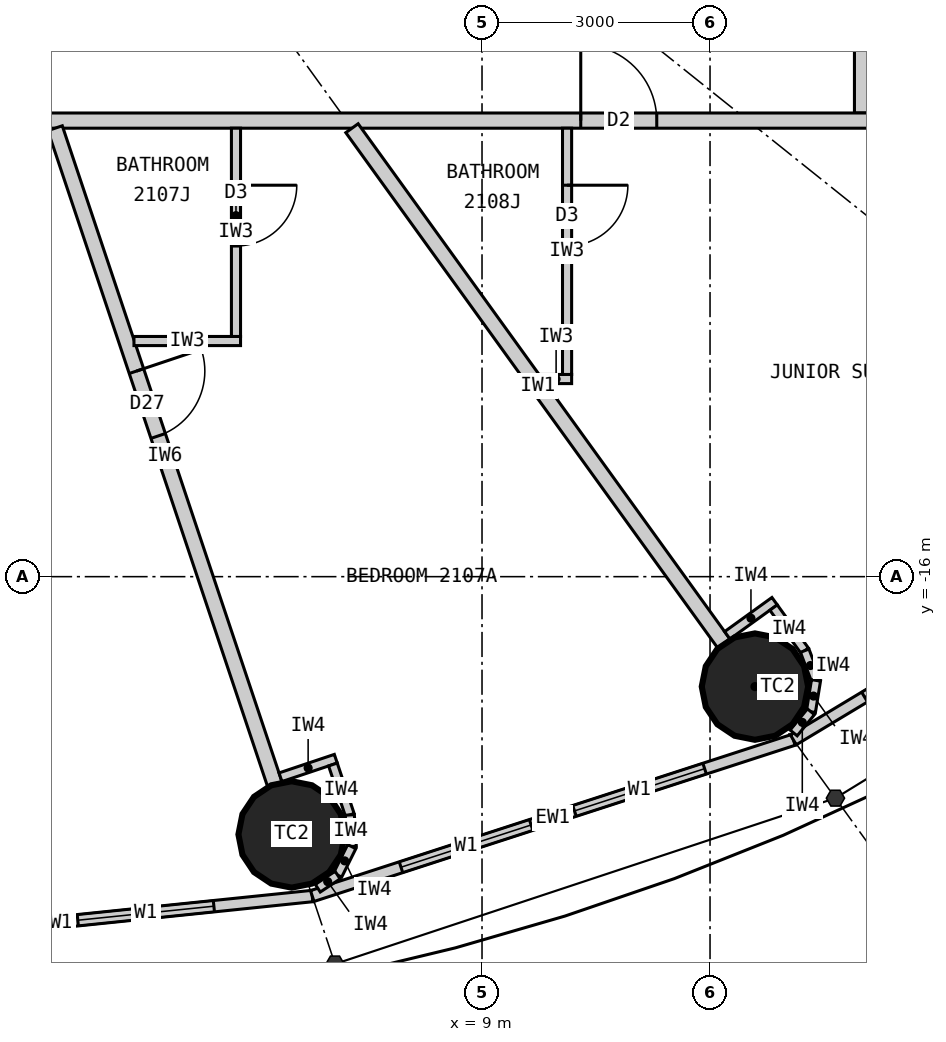
"""IFC4 building model, lengths in metres.
Left out: names, types, materials, properties, quantities, classifications, styles, units other than length and angle.
Written with IfcOpenShell. Run it as: python <this file> out.ifc"""

import sys

from ifc_helpers import new_model, si_unit, direction, frame, frame_2d, origin, origin_2d, place, context, subcontext, project, spatial, rectangle, circle, extrude, element, fill, save


model = new_model("IFC4")
c1 = context("Model", 3, precision=1e-05, world=origin(), true_north=direction((0.0, 1.0)))
c2 = subcontext(c1, "Body", "Model", "MODEL_VIEW")
j1 = project(units=[si_unit("LENGTHUNIT", "METRE"), si_unit("PLANEANGLEUNIT", "RADIAN")], contexts=[c1])
p1 = place(None, origin())
s1 = spatial("IfcSite", under=j1, at=p1, CompositionType="ELEMENT")
p2 = place(p1, origin())
s2 = spatial("IfcBuilding", under=s1, at=p2, CompositionType="ELEMENT")
p3 = place(p2, frame((0.0, 0.0, 83.7)))
s3 = spatial("IfcBuildingStorey", under=s2, at=p3, CompositionType="ELEMENT", Elevation=83.7)
for number, where, z_axis, x_axis in (
    (1, (6.495, -19.391, 0.0), (0.0, 0.0, 1.0), (1.0, 0.0, 0.0)),
    (2, (12.591, -17.447, 0.0), (0.0, 0.0, 1.0), (1.0, 0.0, 0.0)),
):
    element("IfcColumn", number, at=place(p3, frame(where, z_axis=z_axis, x_axis=x_axis)), inside=s3, PredefinedType="COLUMN", context=c2, shape_type="SweptSolid", body=[
        extrude(circle(Radius=0.7, at=origin_2d()), origin(), (0.0, 0.0, 1.0), 3.3),
    ])
p4 = place(p3, frame((0.0, -20.9, 0.0), z_axis=(0.0, 0.0, 1.0), x_axis=(0.994721394369, 0.102612609291, 0.0)))
e3 = element("IfcWall", 3, at=p4, inside=s3, PredefinedType="ELEMENTEDWALL", context=c2, shape_type="SweptSolid", body=[
    extrude(rectangle(XDim=6.802, YDim=0.15, at=frame_2d((3.401, 0.0))), origin(), (0.0, 0.0, 1.0), 3.12),
])
p5 = place(p4, frame((1.301, 0.0, 0.9)))
e4 = element("IfcOpeningElement", 4, at=p5, cuts=e3, PredefinedType="OPENING", context=c2, shape_type="SweptSolid", body=[
    extrude(rectangle(XDim=1.8, YDim=1.9, at=frame_2d((0.9, 0.95))), frame((0.0, 0.085, 0.0), z_axis=(0.0, -1.0, 0.0), x_axis=(1.0, 0.0, 0.0)), (0.0, 0.0, 1.0), 0.17),
])
p6 = place(p4, frame((3.701, 0.0, 0.9)))
e5 = element("IfcOpeningElement", 5, at=p6, cuts=e3, PredefinedType="OPENING", context=c2, shape_type="SweptSolid", body=[
    extrude(rectangle(XDim=1.8, YDim=1.9, at=frame_2d((0.9, 0.95))), frame((0.0, 0.085, 0.0), z_axis=(0.0, -1.0, 0.0), x_axis=(1.0, 0.0, 0.0)), (0.0, 0.0, 1.0), 0.17),
])
p7 = place(p3, frame((6.766, -20.202, 0.0), z_axis=(0.0, 0.0, 1.0), x_axis=(0.951137534625, 0.308767534285, 0.0)))
e6 = element("IfcWall", 6, at=p7, inside=s3, PredefinedType="ELEMENTEDWALL", context=c2, shape_type="SweptSolid", body=[
    extrude(rectangle(XDim=6.655, YDim=0.15, at=frame_2d((3.328, 0.0))), origin(), (0.0, 0.0, 1.0), 3.12),
])
p8 = place(p7, frame((1.228, 0.0, 0.9)))
e7 = element("IfcOpeningElement", 7, at=p8, cuts=e6, PredefinedType="OPENING", context=c2, shape_type="SweptSolid", body=[
    extrude(rectangle(XDim=1.8, YDim=1.9, at=frame_2d((0.9, 0.95))), frame((0.0, 0.085, 0.0), z_axis=(0.0, -1.0, 0.0), x_axis=(1.0, 0.0, 0.0)), (0.0, 0.0, 1.0), 0.17),
])
p9 = place(p7, frame((3.628, 0.0, 0.9)))
e8 = element("IfcOpeningElement", 8, at=p9, cuts=e6, PredefinedType="OPENING", context=c2, shape_type="SweptSolid", body=[
    extrude(rectangle(XDim=1.8, YDim=1.9, at=frame_2d((0.9, 0.95))), frame((0.0, 0.085, 0.0), z_axis=(0.0, -1.0, 0.0), x_axis=(1.0, 0.0, 0.0)), (0.0, 0.0, 1.0), 0.17),
])
p10 = place(p3, frame((13.096, -18.147, 0.0), z_axis=(0.0, 0.0, 1.0), x_axis=(0.856983180864, 0.515344377787, 0.0)))
e9 = element("IfcWall", 9, at=p10, inside=s3, PredefinedType="ELEMENTEDWALL", context=c2, shape_type="SweptSolid", body=[
    extrude(rectangle(XDim=6.386, YDim=0.15, at=frame_2d((3.193, 0.0))), origin(), (0.0, 0.0, 1.0), 3.12),
])
p11 = place(p10, frame((1.093, 0.0, 0.9)))
e10 = element("IfcOpeningElement", 10, at=p11, cuts=e9, PredefinedType="OPENING", context=c2, shape_type="SweptSolid", body=[
    extrude(rectangle(XDim=1.8, YDim=1.9, at=frame_2d((0.9, 0.95))), frame((0.0, 0.085, 0.0), z_axis=(0.0, -1.0, 0.0), x_axis=(1.0, 0.0, 0.0)), (0.0, 0.0, 1.0), 0.17),
])
p12 = place(p10, frame((3.493, 0.0, 0.9)))
e11 = element("IfcOpeningElement", 11, at=p12, cuts=e9, PredefinedType="OPENING", context=c2, shape_type="SweptSolid", body=[
    extrude(rectangle(XDim=1.8, YDim=1.9, at=frame_2d((0.9, 0.95))), frame((0.0, 0.085, 0.0), z_axis=(0.0, -1.0, 0.0), x_axis=(1.0, 0.0, 0.0)), (0.0, 0.0, 1.0), 0.17),
])
p13 = place(p3, frame((14.0, -9.9, 0.0), z_axis=(0.0, 0.0, 1.0), x_axis=(0.0, 1.0, 0.0)))
e12 = element("IfcWall", 12, at=p13, inside=s3, PredefinedType="PARTITIONING", context=c2, shape_type="SweptSolid", body=[
    extrude(rectangle(XDim=19.8, YDim=0.2, at=frame_2d((9.9, 0.0))), origin(), (0.0, 0.0, 1.0), 3.12),
])
p14 = place(p13, frame((5.948, 0.0, 0.0)))
e13 = element("IfcOpeningElement", 13, at=p14, cuts=e12, PredefinedType="OPENING", context=c2, shape_type="SweptSolid", body=[
    extrude(rectangle(XDim=1.0, YDim=2.2, at=frame_2d((0.5, 1.1))), frame((0.0, 0.11, 0.0), z_axis=(0.0, -1.0, 0.0), x_axis=(1.0, 0.0, 0.0)), (0.0, 0.0, 1.0), 0.22),
])
p15 = place(p13, frame((11.46, 0.0, 0.0)))
e14 = element("IfcOpeningElement", 14, at=p15, cuts=e12, PredefinedType="OPENING", context=c2, shape_type="SweptSolid", body=[
    extrude(rectangle(XDim=1.0, YDim=2.2, at=frame_2d((0.5, 1.1))), frame((0.0, 0.11, 0.0), z_axis=(0.0, -1.0, 0.0), x_axis=(1.0, 0.0, 0.0)), (0.0, 0.0, 1.0), 0.22),
])
p16 = place(p3, frame((14.1, -10.0, 0.0), z_axis=(0.0, 0.0, 1.0), x_axis=(-1.0, 0.0, 0.0)))
e15 = element("IfcWall", 15, at=p16, inside=s3, PredefinedType="PARTITIONING", context=c2, shape_type="SweptSolid", body=[
    extrude(rectangle(XDim=28.2, YDim=0.2, at=frame_2d((14.1, 0.0))), origin(), (0.0, 0.0, 1.0), 3.12),
])
p17 = place(p16, frame((23.865, 0.0, 0.0)))
e16 = element("IfcOpeningElement", 16, at=p17, cuts=e15, PredefinedType="OPENING", context=c2, shape_type="SweptSolid", body=[
    extrude(rectangle(XDim=1.0, YDim=2.2, at=frame_2d((0.5, 1.1))), frame((0.0, 0.11, 0.0), z_axis=(0.0, -1.0, 0.0), x_axis=(1.0, 0.0, 0.0)), (0.0, 0.0, 1.0), 0.22),
])
p18 = place(p16, frame((18.529, 0.0, 0.0)))
e17 = element("IfcOpeningElement", 17, at=p18, cuts=e15, PredefinedType="OPENING", context=c2, shape_type="SweptSolid", body=[
    extrude(rectangle(XDim=1.0, YDim=2.2, at=frame_2d((0.5, 1.1))), frame((0.0, 0.11, 0.0), z_axis=(0.0, -1.0, 0.0), x_axis=(1.0, 0.0, 0.0)), (0.0, 0.0, 1.0), 0.22),
])
p19 = place(p16, frame((14.923, 0.0, 0.0)))
e18 = element("IfcOpeningElement", 18, at=p19, cuts=e15, PredefinedType="OPENING", context=c2, shape_type="SweptSolid", body=[
    extrude(rectangle(XDim=1.0, YDim=2.2, at=frame_2d((0.5, 1.1))), frame((0.0, 0.11, 0.0), z_axis=(0.0, -1.0, 0.0), x_axis=(1.0, 0.0, 0.0)), (0.0, 0.0, 1.0), 0.22),
])
p20 = place(p16, frame((2.801, 0.0, 0.0)))
e19 = element("IfcOpeningElement", 19, at=p20, cuts=e15, PredefinedType="OPENING", context=c2, shape_type="SweptSolid", body=[
    extrude(rectangle(XDim=1.0, YDim=2.2, at=frame_2d((0.5, 1.1))), frame((0.0, 0.11, 0.0), z_axis=(0.0, -1.0, 0.0), x_axis=(1.0, 0.0, 0.0)), (0.0, 0.0, 1.0), 0.22),
])
p21 = place(p3, frame((3.383, -10.1, 0.0), z_axis=(0.0, 0.0, 1.0), x_axis=(0.31759592231, -0.948226149256, 0.0)))
e20 = element("IfcWall", 20, at=p21, inside=s3, PredefinedType="PARTITIONING", context=c2, shape_type="SweptSolid", body=[
    extrude(rectangle(XDim=9.098, YDim=0.2, at=frame_2d((4.549, 0.0))), origin(), (0.0, 0.0, 1.0), 2.32),
])
p22 = place(p21, frame((3.37, 0.0, 0.0)))
e21 = element("IfcOpeningElement", 21, at=p22, cuts=e20, PredefinedType="OPENING", context=c2, shape_type="SweptSolid", body=[
    extrude(rectangle(XDim=0.9, YDim=2.1, at=frame_2d((0.45, 1.05))), frame((0.0, 0.11, 0.0), z_axis=(0.0, -1.0, 0.0), x_axis=(1.0, 0.0, 0.0)), (0.0, 0.0, 1.0), 0.22),
])
p23 = place(p3, frame((7.289, -10.1, 0.0), z_axis=(0.0, 0.0, 1.0), x_axis=(0.585198353053, -0.810890182197, 0.0)))
e22 = element("IfcWall", 22, at=p23, inside=s3, PredefinedType="PARTITIONING", context=c2, shape_type="SweptSolid", body=[
    extrude(rectangle(XDim=8.36, YDim=0.2, at=frame_2d((4.18, 0.0))), origin(), (0.0, 0.0, 1.0), 2.32),
])
p24 = place(p3, frame((4.421, -12.9, 0.0), z_axis=(0.0, 0.0, 1.0), x_axis=(1.0, 0.0, 0.0)))
e23 = element("IfcWall", 23, at=p24, inside=s3, PredefinedType="PARTITIONING", context=c2, shape_type="SweptSolid", body=[
    extrude(rectangle(XDim=1.402, YDim=0.12, at=frame_2d((0.701, 0.0))), origin(), (0.0, 0.0, 1.0), 3.12),
])
p25 = place(p3, frame((5.763, -10.1, 0.0), z_axis=(0.0, 0.0, 1.0), x_axis=(0.0, -1.0, 0.0)))
e24 = element("IfcWall", 24, at=p25, inside=s3, PredefinedType="PARTITIONING", context=c2, shape_type="SweptSolid", body=[
    extrude(rectangle(XDim=2.74, YDim=0.12, at=frame_2d((1.37, 0.0))), origin(), (0.0, 0.0, 1.0), 3.12),
])
p26 = place(p25, frame((0.75, 0.0, 0.0)))
e25 = element("IfcOpeningElement", 25, at=p26, cuts=e24, PredefinedType="OPENING", context=c2, shape_type="SweptSolid", body=[
    extrude(rectangle(XDim=0.8, YDim=2.1, at=frame_2d((0.4, 1.05))), frame((0.0, 0.07, 0.0), z_axis=(0.0, -1.0, 0.0), x_axis=(1.0, 0.0, 0.0)), (0.0, 0.0, 1.0), 0.14),
])
p27 = place(p3, frame((9.771, -13.4, 0.0), z_axis=(0.0, 0.0, 1.0), x_axis=(1.0, 0.0, 0.0)))
e26 = element("IfcWall", 26, at=p27, inside=s3, PredefinedType="PARTITIONING", context=c2, shape_type="SweptSolid", body=[
    extrude(rectangle(XDim=0.408, YDim=0.12, at=frame_2d((0.204, 0.0))), origin(), (0.0, 0.0, 1.0), 3.12),
])
p28 = place(p3, frame((10.119, -10.1, 0.0), z_axis=(0.0, 0.0, 1.0), x_axis=(0.0, -1.0, 0.0)))
e27 = element("IfcWall", 27, at=p28, inside=s3, PredefinedType="PARTITIONING", context=c2, shape_type="SweptSolid", body=[
    extrude(rectangle(XDim=3.24, YDim=0.12, at=frame_2d((1.62, 0.0))), origin(), (0.0, 0.0, 1.0), 3.12),
])
p29 = place(p28, frame((0.75, 0.0, 0.0)))
e28 = element("IfcOpeningElement", 28, at=p29, cuts=e27, PredefinedType="OPENING", context=c2, shape_type="SweptSolid", body=[
    extrude(rectangle(XDim=0.8, YDim=2.1, at=frame_2d((0.4, 1.05))), frame((0.0, 0.07, 0.0), z_axis=(0.0, -1.0, 0.0), x_axis=(1.0, 0.0, 0.0)), (0.0, 0.0, 1.0), 0.14),
])
p30 = place(p3, frame((6.348, -18.639, 0.0), z_axis=(0.0, 0.0, 1.0), x_axis=(0.948268951266, 0.317468102437, 0.0)))
e29 = element("IfcWall", 29, at=p30, inside=s3, PredefinedType="PARTITIONING", context=c2, shape_type="SweptSolid", body=[
    extrude(rectangle(XDim=0.768, YDim=0.12, at=frame_2d((0.384, 0.0))), origin(), (0.0, 0.0, 1.0), 3.12),
])
p31 = place(p3, frame((7.038, -18.471, 0.0), z_axis=(0.0, 0.0, 1.0), x_axis=(0.317378466199, -0.9482989556, 0.0)))
e30 = element("IfcWall", 30, at=p31, inside=s3, PredefinedType="PARTITIONING", context=c2, shape_type="SweptSolid", body=[
    extrude(rectangle(XDim=0.7, YDim=0.12, at=frame_2d((0.35, 0.0))), origin(), (0.0, 0.0, 1.0), 3.12),
])
p32 = place(p3, frame((7.26, -19.135, 0.0), z_axis=(0.0, 0.0, 1.0), x_axis=(0.0613238046, -0.99811792439, 0.0)))
e31 = element("IfcWall", 31, at=p32, inside=s3, PredefinedType="PARTITIONING", context=c2, shape_type="SweptSolid", body=[
    extrude(rectangle(XDim=0.418, YDim=0.12, at=frame_2d((0.209, 0.0))), origin(), (0.0, 0.0, 1.0), 3.12),
])
p33 = place(p3, frame((7.286, -19.552, 0.0), z_axis=(0.0, 0.0, 1.0), x_axis=(-0.445810757773, -0.89512723579, 0.0)))
e32 = element("IfcWall", 32, at=p33, inside=s3, PredefinedType="PARTITIONING", context=c2, shape_type="SweptSolid", body=[
    extrude(rectangle(XDim=0.418, YDim=0.12, at=frame_2d((0.209, 0.0))), origin(), (0.0, 0.0, 1.0), 3.12),
])
p34 = place(p3, frame((7.1, -19.926, 0.0), z_axis=(0.0, 0.0, 1.0), x_axis=(-0.833488262509, -0.552537162787, 0.0)))
e33 = element("IfcWall", 33, at=p34, inside=s3, PredefinedType="PARTITIONING", context=c2, shape_type="SweptSolid", body=[
    extrude(rectangle(XDim=0.313, YDim=0.12, at=frame_2d((0.156, 0.0))), origin(), (0.0, 0.0, 1.0), 3.12),
])
p35 = place(p3, frame((12.227, -16.772, 0.0), z_axis=(0.0, 0.0, 1.0), x_axis=(0.810821798253, 0.585293098778, 0.0)))
e34 = element("IfcWall", 34, at=p35, inside=s3, PredefinedType="PARTITIONING", context=c2, shape_type="SweptSolid", body=[
    extrude(rectangle(XDim=0.768, YDim=0.12, at=frame_2d((0.384, 0.0))), origin(), (0.0, 0.0, 1.0), 3.12),
])
p36 = place(p3, frame((12.836, -16.406, 0.0), z_axis=(0.0, 0.0, 1.0), x_axis=(0.585223113993, -0.810872312296, 0.0)))
e35 = element("IfcWall", 35, at=p36, inside=s3, PredefinedType="PARTITIONING", context=c2, shape_type="SweptSolid", body=[
    extrude(rectangle(XDim=0.7, YDim=0.12, at=frame_2d((0.35, 0.0))), origin(), (0.0, 0.0, 1.0), 3.12),
])
p37 = place(p3, frame((13.246, -16.974, 0.0), z_axis=(0.0, 0.0, 1.0), x_axis=(0.355728122235, -0.934589483705, 0.0)))
e36 = element("IfcWall", 36, at=p37, inside=s3, PredefinedType="PARTITIONING", context=c2, shape_type="SweptSolid", body=[
    extrude(rectangle(XDim=0.418, YDim=0.12, at=frame_2d((0.209, 0.0))), origin(), (0.0, 0.0, 1.0), 3.12),
])
p38 = place(p3, frame((13.394, -17.365, 0.0), z_axis=(0.0, 0.0, 1.0), x_axis=(-0.159379276926, -0.987217425943, 0.0)))
e37 = element("IfcWall", 37, at=p38, inside=s3, PredefinedType="PARTITIONING", context=c2, shape_type="SweptSolid", body=[
    extrude(rectangle(XDim=0.418, YDim=0.12, at=frame_2d((0.209, 0.0))), origin(), (0.0, 0.0, 1.0), 3.12),
])
p39 = place(p3, frame((13.328, -17.777, 0.0), z_axis=(0.0, 0.0, 1.0), x_axis=(-0.632276783541, -0.774742582407, 0.0)))
e38 = element("IfcWall", 38, at=p39, inside=s3, PredefinedType="PARTITIONING", context=c2, shape_type="SweptSolid", body=[
    extrude(rectangle(XDim=0.36, YDim=0.12, at=frame_2d((0.18, 0.0))), origin(), (0.0, 0.0, 1.0), 3.12),
])
p40 = place(p6, origin())
e39 = element("IfcWindow", 39, at=p40, inside=s3, PartitioningType="SINGLE_PANEL", PredefinedType="WINDOW", context=c2, shape_type="SweptSolid", body=[
    extrude(rectangle(XDim=1.8, YDim=1.9, at=frame_2d((0.9, 0.95))), frame((0.0, 0.03, 0.0), z_axis=(0.0, -1.0, 0.0), x_axis=(1.0, 0.0, 0.0)), (0.0, 0.0, 1.0), 0.06),
])
fill(e5, e39)
p41 = place(p8, origin())
e40 = element("IfcWindow", 40, at=p41, inside=s3, PartitioningType="SINGLE_PANEL", PredefinedType="WINDOW", context=c2, shape_type="SweptSolid", body=[
    extrude(rectangle(XDim=1.8, YDim=1.9, at=frame_2d((0.9, 0.95))), frame((0.0, 0.03, 0.0), z_axis=(0.0, -1.0, 0.0), x_axis=(1.0, 0.0, 0.0)), (0.0, 0.0, 1.0), 0.06),
])
fill(e7, e40)
p42 = place(p9, origin())
e41 = element("IfcWindow", 41, at=p42, inside=s3, PartitioningType="SINGLE_PANEL", PredefinedType="WINDOW", context=c2, shape_type="SweptSolid", body=[
    extrude(rectangle(XDim=1.8, YDim=1.9, at=frame_2d((0.9, 0.95))), frame((0.0, 0.03, 0.0), z_axis=(0.0, -1.0, 0.0), x_axis=(1.0, 0.0, 0.0)), (0.0, 0.0, 1.0), 0.06),
])
fill(e8, e41)
p43 = place(p11, origin())
e42 = element("IfcWindow", 42, at=p43, inside=s3, PartitioningType="SINGLE_PANEL", PredefinedType="WINDOW", context=c2, shape_type="SweptSolid", body=[
    extrude(rectangle(XDim=1.8, YDim=1.9, at=frame_2d((0.9, 0.95))), frame((0.0, 0.03, 0.0), z_axis=(0.0, -1.0, 0.0), x_axis=(1.0, 0.0, 0.0)), (0.0, 0.0, 1.0), 0.06),
])
fill(e10, e42)
p44 = place(p26, origin())
e43 = element("IfcDoor", 43, at=p44, inside=s3, OperationType="SINGLE_SWING_LEFT", PredefinedType="DOOR", context=c2, shape_type="SweptSolid", body=[
    extrude(rectangle(XDim=0.8, YDim=2.1, at=frame_2d((0.4, 1.05))), frame((0.0, 0.025, 0.0), z_axis=(0.0, -1.0, 0.0), x_axis=(1.0, 0.0, 0.0)), (0.0, 0.0, 1.0), 0.05),
])
fill(e25, e43)
p45 = place(p22, origin())
e44 = element("IfcDoor", 44, at=p45, inside=s3, OperationType="SINGLE_SWING_LEFT", PredefinedType="DOOR", context=c2, shape_type="SweptSolid", body=[
    extrude(rectangle(XDim=0.9, YDim=2.1, at=frame_2d((0.45, 1.05))), frame((0.0, 0.025, 0.0), z_axis=(0.0, -1.0, 0.0), x_axis=(1.0, 0.0, 0.0)), (0.0, 0.0, 1.0), 0.05),
])
fill(e21, e44)
p46 = place(p29, origin())
e45 = element("IfcDoor", 45, at=p46, inside=s3, OperationType="SINGLE_SWING_LEFT", PredefinedType="DOOR", context=c2, shape_type="SweptSolid", body=[
    extrude(rectangle(XDim=0.8, YDim=2.1, at=frame_2d((0.4, 1.05))), frame((0.0, 0.025, 0.0), z_axis=(0.0, -1.0, 0.0), x_axis=(1.0, 0.0, 0.0)), (0.0, 0.0, 1.0), 0.05),
])
fill(e28, e45)
p47 = place(p20, origin())
e46 = element("IfcDoor", 46, at=p47, inside=s3, OperationType="SINGLE_SWING_RIGHT", PredefinedType="DOOR", context=c2, shape_type="SweptSolid", body=[
    extrude(rectangle(XDim=1.0, YDim=2.2, at=frame_2d((0.5, 1.1))), frame((0.0, 0.025, 0.0), z_axis=(0.0, -1.0, 0.0), x_axis=(1.0, 0.0, 0.0)), (0.0, 0.0, 1.0), 0.05),
])
fill(e19, e46)
save(model, sys.argv[1])
